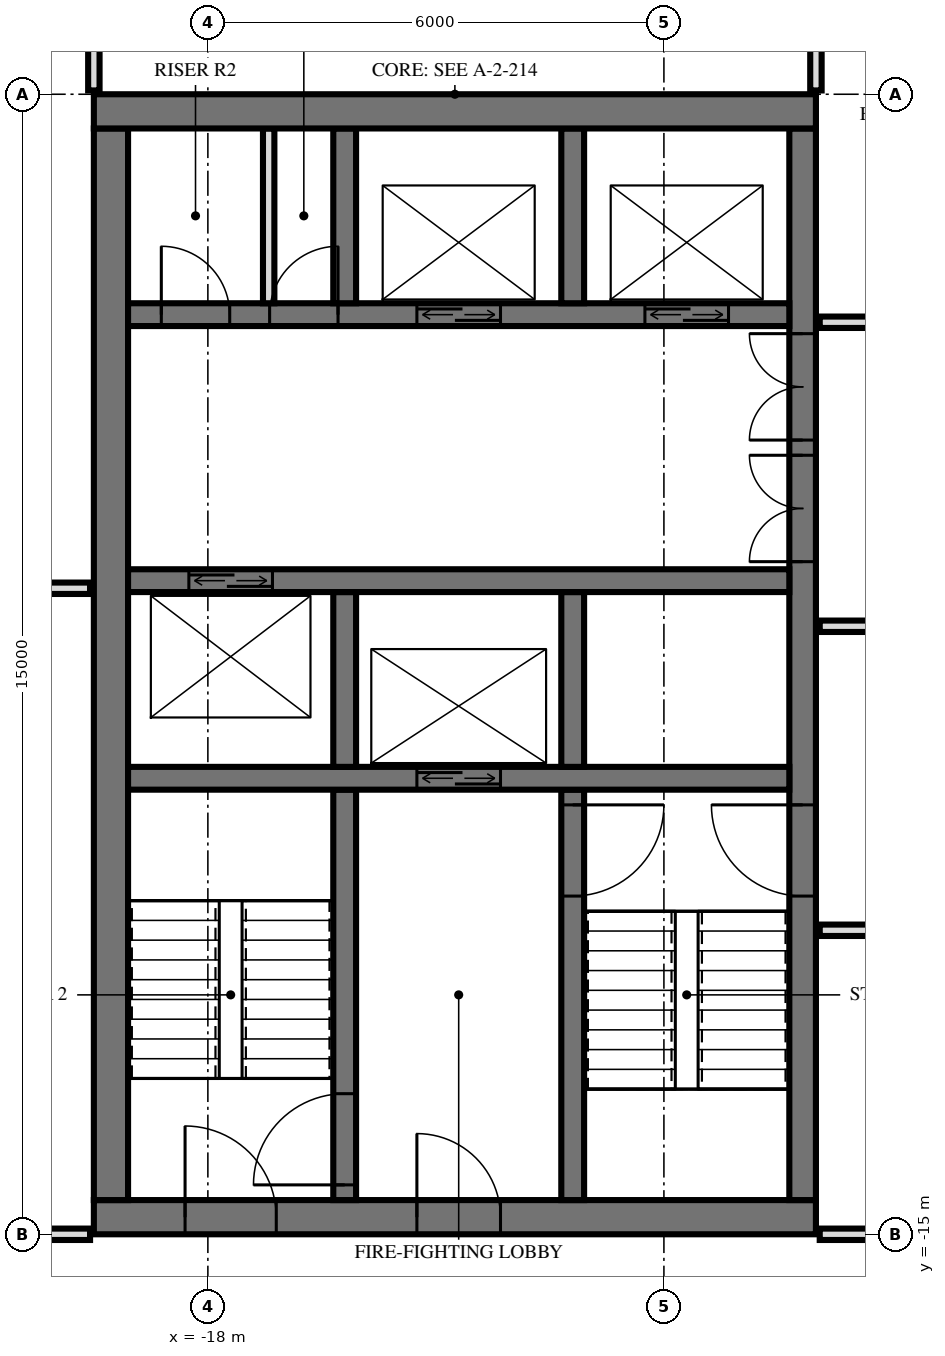
"""IFC4 building model, lengths in metres.
Left out: names, types, materials, properties, quantities, classifications, styles, units other than length and angle.
Written with IfcOpenShell. Run it as: python <this file> out.ifc"""

import sys

from ifc_helpers import new_model, si_unit, direction, frame, frame_2d, origin, place, context, subcontext, project, spatial, rectangle, extrude, element, fill, save


model = new_model("IFC4")
c1 = context("Model", 3, precision=1e-05, world=origin(), true_north=direction((0.0, 1.0)))
c2 = subcontext(c1, "Body", "Model", "MODEL_VIEW")
j1 = project(units=[si_unit("LENGTHUNIT", "METRE"), si_unit("PLANEANGLEUNIT", "RADIAN")], contexts=[c1])
p1 = place(None, origin())
s1 = spatial("IfcSite", under=j1, at=p1, CompositionType="ELEMENT")
p2 = place(p1, origin())
s2 = spatial("IfcBuilding", under=s1, at=p2, CompositionType="ELEMENT")
p3 = place(p2, frame((0.0, 0.0, 298.1)))
s3 = spatial("IfcBuildingStorey", under=s2, at=p3, CompositionType="ELEMENT", Elevation=298.1)
p4 = place(p3, frame((-19.5, -0.225, 0.0), z_axis=(0.0, 0.0, 1.0), x_axis=(1.0, 0.0, 0.0)))
e1 = element("IfcWall", 1, at=p4, inside=s3, PredefinedType="SHEAR", context=c2, shape_type="SweptSolid", body=[
    extrude(rectangle(XDim=9.5, YDim=0.45, at=frame_2d((4.75, 0.0))), origin(), (0.0, 0.0, 1.0), 3.5),
])
p5 = place(p3, frame((-19.5, -14.775, 0.0), z_axis=(0.0, 0.0, 1.0), x_axis=(1.0, 0.0, 0.0)))
e2 = element("IfcWall", 2, at=p5, inside=s3, PredefinedType="SHEAR", context=c2, shape_type="SweptSolid", body=[
    extrude(rectangle(XDim=9.5, YDim=0.45, at=frame_2d((4.75, 0.0))), origin(), (0.0, 0.0, 1.0), 3.5),
])
p6 = place(p5, frame((1.2, 0.0, 0.0)))
e3 = element("IfcOpeningElement", 3, at=p6, cuts=e2, PredefinedType="OPENING", context=c2, shape_type="SweptSolid", body=[
    extrude(rectangle(XDim=1.2, YDim=2.1, at=frame_2d((0.6, 1.05))), frame((0.0, 0.235, 0.0), z_axis=(0.0, -1.0, 0.0), x_axis=(1.0, 0.0, 0.0)), (0.0, 0.0, 1.0), 0.47),
])
p7 = place(p5, frame((4.25, 0.0, 0.0)))
e4 = element("IfcOpeningElement", 4, at=p7, cuts=e2, PredefinedType="OPENING", context=c2, shape_type="SweptSolid", body=[
    extrude(rectangle(XDim=1.1, YDim=2.1, at=frame_2d((0.55, 1.05))), frame((0.0, 0.235, 0.0), z_axis=(0.0, -1.0, 0.0), x_axis=(1.0, 0.0, 0.0)), (0.0, 0.0, 1.0), 0.47),
])
p8 = place(p3, frame((-10.175, -14.55, 0.0), z_axis=(0.0, 0.0, 1.0), x_axis=(0.0, 1.0, 0.0)))
e5 = element("IfcWall", 5, at=p8, inside=s3, PredefinedType="SHEAR", context=c2, shape_type="SweptSolid", body=[
    extrude(rectangle(XDim=14.1, YDim=0.35, at=frame_2d((7.05, 0.0))), origin(), (0.0, 0.0, 1.0), 3.5),
])
p9 = place(p8, frame((8.4, 0.0, 0.0)))
e6 = element("IfcOpeningElement", 6, at=p9, cuts=e5, PredefinedType="OPENING", context=c2, shape_type="SweptSolid", body=[
    extrude(rectangle(XDim=1.4, YDim=2.4, at=frame_2d((0.7, 1.2))), frame((0.0, 0.185, 0.0), z_axis=(0.0, -1.0, 0.0), x_axis=(1.0, 0.0, 0.0)), (0.0, 0.0, 1.0), 0.37),
])
p10 = place(p8, frame((10.0, 0.0, 0.0)))
e7 = element("IfcOpeningElement", 7, at=p10, cuts=e5, PredefinedType="OPENING", context=c2, shape_type="SweptSolid", body=[
    extrude(rectangle(XDim=1.4, YDim=2.4, at=frame_2d((0.7, 1.2))), frame((0.0, 0.185, 0.0), z_axis=(0.0, -1.0, 0.0), x_axis=(1.0, 0.0, 0.0)), (0.0, 0.0, 1.0), 0.37),
])
p11 = place(p8, frame((4.0, 0.0, 0.0)))
e8 = element("IfcOpeningElement", 8, at=p11, cuts=e5, PredefinedType="OPENING", context=c2, shape_type="SweptSolid", body=[
    extrude(rectangle(XDim=1.2, YDim=2.1, at=frame_2d((0.6, 1.05))), frame((0.0, 0.185, 0.0), z_axis=(0.0, -1.0, 0.0), x_axis=(1.0, 0.0, 0.0)), (0.0, 0.0, 1.0), 0.37),
])
p12 = place(p3, frame((-19.275, -14.55, 0.0), z_axis=(0.0, 0.0, 1.0), x_axis=(0.0, 1.0, 0.0)))
e9 = element("IfcWall", 9, at=p12, inside=s3, PredefinedType="SHEAR", context=c2, shape_type="SweptSolid", body=[
    extrude(rectangle(XDim=14.1, YDim=0.45, at=frame_2d((7.05, 0.0))), origin(), (0.0, 0.0, 1.0), 3.5),
])
p13 = place(p3, frame((-19.05, -2.9, 0.0), z_axis=(0.0, 0.0, 1.0), x_axis=(1.0, 0.0, 0.0)))
e10 = element("IfcWall", 10, at=p13, inside=s3, PredefinedType="SHEAR", context=c2, shape_type="SweptSolid", body=[
    extrude(rectangle(XDim=8.7, YDim=0.3, at=frame_2d((4.35, 0.0))), origin(), (0.0, 0.0, 1.0), 3.5),
])
p14 = place(p13, frame((6.8, 0.0, 0.0)))
e11 = element("IfcOpeningElement", 11, at=p14, cuts=e10, PredefinedType="OPENING", context=c2, shape_type="SweptSolid", body=[
    extrude(rectangle(XDim=1.1, YDim=2.1, at=frame_2d((0.55, 1.05))), frame((0.0, 0.16, 0.0), z_axis=(0.0, -1.0, 0.0), x_axis=(1.0, 0.0, 0.0)), (0.0, 0.0, 1.0), 0.32),
])
p15 = place(p13, frame((3.8, 0.0, 0.0)))
e12 = element("IfcOpeningElement", 12, at=p15, cuts=e10, PredefinedType="OPENING", context=c2, shape_type="SweptSolid", body=[
    extrude(rectangle(XDim=1.1, YDim=2.1, at=frame_2d((0.55, 1.05))), frame((0.0, 0.16, 0.0), z_axis=(0.0, -1.0, 0.0), x_axis=(1.0, 0.0, 0.0)), (0.0, 0.0, 1.0), 0.32),
])
p16 = place(p13, frame((1.863, 0.0, 0.0)))
e13 = element("IfcOpeningElement", 13, at=p16, cuts=e10, PredefinedType="OPENING", context=c2, shape_type="SweptSolid", body=[
    extrude(rectangle(XDim=0.9, YDim=2.1, at=frame_2d((0.45, 1.05))), frame((0.0, 0.16, 0.0), z_axis=(0.0, -1.0, 0.0), x_axis=(1.0, 0.0, 0.0)), (0.0, 0.0, 1.0), 0.32),
])
p17 = place(p13, frame((0.438, 0.0, 0.0)))
e14 = element("IfcOpeningElement", 14, at=p17, cuts=e10, PredefinedType="OPENING", context=c2, shape_type="SweptSolid", body=[
    extrude(rectangle(XDim=0.9, YDim=2.1, at=frame_2d((0.45, 1.05))), frame((0.0, 0.16, 0.0), z_axis=(0.0, -1.0, 0.0), x_axis=(1.0, 0.0, 0.0)), (0.0, 0.0, 1.0), 0.32),
])
p18 = place(p3, frame((-19.05, -6.4, 0.0), z_axis=(0.0, 0.0, 1.0), x_axis=(1.0, 0.0, 0.0)))
e15 = element("IfcWall", 15, at=p18, inside=s3, PredefinedType="SHEAR", context=c2, shape_type="SweptSolid", body=[
    extrude(rectangle(XDim=8.7, YDim=0.3, at=frame_2d((4.35, 0.0))), origin(), (0.0, 0.0, 1.0), 3.5),
])
p19 = place(p18, frame((0.8, 0.0, 0.0)))
e16 = element("IfcOpeningElement", 16, at=p19, cuts=e15, PredefinedType="OPENING", context=c2, shape_type="SweptSolid", body=[
    extrude(rectangle(XDim=1.1, YDim=2.1, at=frame_2d((0.55, 1.05))), frame((0.0, 0.16, 0.0), z_axis=(0.0, -1.0, 0.0), x_axis=(1.0, 0.0, 0.0)), (0.0, 0.0, 1.0), 0.32),
])
p20 = place(p3, frame((-19.05, -9.0, 0.0), z_axis=(0.0, 0.0, 1.0), x_axis=(1.0, 0.0, 0.0)))
e17 = element("IfcWall", 17, at=p20, inside=s3, PredefinedType="SHEAR", context=c2, shape_type="SweptSolid", body=[
    extrude(rectangle(XDim=8.7, YDim=0.3, at=frame_2d((4.35, 0.0))), origin(), (0.0, 0.0, 1.0), 3.5),
])
p21 = place(p20, frame((3.8, 0.0, 0.0)))
e18 = element("IfcOpeningElement", 18, at=p21, cuts=e17, PredefinedType="OPENING", context=c2, shape_type="SweptSolid", body=[
    extrude(rectangle(XDim=1.1, YDim=2.1, at=frame_2d((0.55, 1.05))), frame((0.0, 0.16, 0.0), z_axis=(0.0, -1.0, 0.0), x_axis=(1.0, 0.0, 0.0)), (0.0, 0.0, 1.0), 0.32),
])
for number, where, z_axis, x_axis in (
    (19, (-13.2, -2.75, 0.0), (0.0, 0.0, 1.0), (0.0, 1.0, 0.0)),
    (20, (-13.2, -8.85, 0.0), (0.0, 0.0, 1.0), (0.0, 1.0, 0.0)),
):
    element("IfcWall", number, at=place(p3, frame(where, z_axis=z_axis, x_axis=x_axis)), inside=s3, PredefinedType="SHEAR", context=c2, shape_type="SweptSolid", body=[
        extrude(rectangle(XDim=2.3, YDim=0.3, at=frame_2d((1.15, 0.0))), origin(), (0.0, 0.0, 1.0), 3.5),
    ])
p22 = place(p3, frame((-13.2, -14.55, 0.0), z_axis=(0.0, 0.0, 1.0), x_axis=(0.0, 1.0, 0.0)))
e21 = element("IfcWall", 21, at=p22, inside=s3, PredefinedType="SHEAR", context=c2, shape_type="SweptSolid", body=[
    extrude(rectangle(XDim=5.4, YDim=0.3, at=frame_2d((2.7, 0.0))), origin(), (0.0, 0.0, 1.0), 3.5),
])
p23 = place(p22, frame((4.0, 0.0, 0.0)))
e22 = element("IfcOpeningElement", 22, at=p23, cuts=e21, PredefinedType="OPENING", context=c2, shape_type="SweptSolid", body=[
    extrude(rectangle(XDim=1.2, YDim=2.1, at=frame_2d((0.6, 1.05))), frame((0.0, 0.16, 0.0), z_axis=(0.0, -1.0, 0.0), x_axis=(1.0, 0.0, 0.0)), (0.0, 0.0, 1.0), 0.32),
])
for number, where, z_axis, x_axis in (
    (23, (-16.2, -2.75, 0.0), (0.0, 0.0, 1.0), (0.0, 1.0, 0.0)),
    (24, (-16.2, -8.85, 0.0), (0.0, 0.0, 1.0), (0.0, 1.0, 0.0)),
):
    element("IfcWall", number, at=place(p3, frame(where, z_axis=z_axis, x_axis=x_axis)), inside=s3, PredefinedType="SHEAR", context=c2, shape_type="SweptSolid", body=[
        extrude(rectangle(XDim=2.3, YDim=0.3, at=frame_2d((1.15, 0.0))), origin(), (0.0, 0.0, 1.0), 3.5),
    ])
p24 = place(p3, frame((-16.2, -14.55, 0.0), z_axis=(0.0, 0.0, 1.0), x_axis=(0.0, 1.0, 0.0)))
e25 = element("IfcWall", 25, at=p24, inside=s3, PredefinedType="SHEAR", context=c2, shape_type="SweptSolid", body=[
    extrude(rectangle(XDim=5.4, YDim=0.3, at=frame_2d((2.7, 0.0))), origin(), (0.0, 0.0, 1.0), 3.5),
])
p25 = place(p24, frame((0.2, 0.0, 0.0)))
e26 = element("IfcOpeningElement", 26, at=p25, cuts=e25, PredefinedType="OPENING", context=c2, shape_type="SweptSolid", body=[
    extrude(rectangle(XDim=1.2, YDim=2.1, at=frame_2d((0.6, 1.05))), frame((0.0, 0.16, 0.0), z_axis=(0.0, -1.0, 0.0), x_axis=(1.0, 0.0, 0.0)), (0.0, 0.0, 1.0), 0.32),
])
p26 = place(p3, frame((-17.2, -2.75, 0.0), z_axis=(0.0, 0.0, 1.0), x_axis=(0.0, 1.0, 0.0)))
e27 = element("IfcWall", 27, at=p26, inside=s3, PredefinedType="PARTITIONING", context=c2, shape_type="SweptSolid", body=[
    extrude(rectangle(XDim=2.3, YDim=0.15, at=frame_2d((1.15, 0.0))), origin(), (0.0, 0.0, 1.0), 3.2),
])
p27 = place(p3, frame((-10.0, 0.05, 0.0), z_axis=(0.0, 0.0, 1.0), x_axis=(0.0, 1.0, 0.0)))
e28 = element("IfcWall", 28, at=p27, inside=s3, PredefinedType="PARTITIONING", context=c2, shape_type="SweptSolid", body=[
    extrude(rectangle(XDim=0.97, YDim=0.15, at=frame_2d((0.485, 0.0))), origin(), (0.0, 0.0, 1.0), 3.22),
])
p28 = place(p3, frame((-19.5, 0.05, 0.0), z_axis=(0.0, 0.0, 1.0), x_axis=(0.0, 1.0, 0.0)))
e29 = element("IfcWall", 29, at=p28, inside=s3, PredefinedType="PARTITIONING", context=c2, shape_type="SweptSolid", body=[
    extrude(rectangle(XDim=0.787, YDim=0.15, at=frame_2d((0.394, 0.0))), origin(), (0.0, 0.0, 1.0), 3.22),
])
p29 = place(p3, frame((-22.92, -15.0, 0.0), z_axis=(0.0, 0.0, 1.0), x_axis=(1.0, 0.0, 0.0)))
e30 = element("IfcWall", 30, at=p29, inside=s3, PredefinedType="PARTITIONING", context=c2, shape_type="SweptSolid", body=[
    extrude(rectangle(XDim=3.37, YDim=0.15, at=frame_2d((1.685, 0.0))), origin(), (0.0, 0.0, 1.0), 3.22),
])
p30 = place(p29, frame((1.47, 0.0, 0.0)))
e31 = element("IfcOpeningElement", 31, at=p30, cuts=e30, PredefinedType="OPENING", context=c2, shape_type="SweptSolid", body=[
    extrude(rectangle(XDim=1.0, YDim=2.1, at=frame_2d((0.5, 1.05))), frame((0.0, 0.085, 0.0), z_axis=(0.0, -1.0, 0.0), x_axis=(1.0, 0.0, 0.0)), (0.0, 0.0, 1.0), 0.17),
])
p31 = place(p3, frame((-9.95, -15.0, 0.0), z_axis=(0.0, 0.0, 1.0), x_axis=(1.0, 0.0, 0.0)))
e32 = element("IfcWall", 32, at=p31, inside=s3, PredefinedType="PARTITIONING", context=c2, shape_type="SweptSolid", body=[
    extrude(rectangle(XDim=19.9, YDim=0.15, at=frame_2d((9.95, 0.0))), origin(), (0.0, 0.0, 1.0), 2.584),
])
p32 = place(p31, frame((9.45, 0.0, 0.0)))
e33 = element("IfcOpeningElement", 33, at=p32, cuts=e32, PredefinedType="OPENING", context=c2, shape_type="SweptSolid", body=[
    extrude(rectangle(XDim=1.0, YDim=2.1, at=frame_2d((0.5, 1.05))), frame((0.0, 0.085, 0.0), z_axis=(0.0, -1.0, 0.0), x_axis=(1.0, 0.0, 0.0)), (0.0, 0.0, 1.0), 0.17),
])
p33 = place(p3, frame((-9.95, -11.0, 0.0), z_axis=(0.0, 0.0, 1.0), x_axis=(1.0, 0.0, 0.0)))
e34 = element("IfcWall", 34, at=p33, inside=s3, PredefinedType="PARTITIONING", context=c2, shape_type="SweptSolid", body=[
    extrude(rectangle(XDim=19.9, YDim=0.15, at=frame_2d((9.95, 0.0))), origin(), (0.0, 0.0, 1.0), 3.22),
])
p34 = place(p33, frame((9.45, 0.0, 0.0)))
e35 = element("IfcOpeningElement", 35, at=p34, cuts=e34, PredefinedType="OPENING", context=c2, shape_type="SweptSolid", body=[
    extrude(rectangle(XDim=1.0, YDim=2.1, at=frame_2d((0.5, 1.05))), frame((0.0, 0.085, 0.0), z_axis=(0.0, -1.0, 0.0), x_axis=(1.0, 0.0, 0.0)), (0.0, 0.0, 1.0), 0.17),
])
p35 = place(p33, frame((15.45, 0.0, 0.0)))
e36 = element("IfcOpeningElement", 36, at=p35, cuts=e34, PredefinedType="OPENING", context=c2, shape_type="SweptSolid", body=[
    extrude(rectangle(XDim=1.0, YDim=2.1, at=frame_2d((0.5, 1.05))), frame((0.0, 0.085, 0.0), z_axis=(0.0, -1.0, 0.0), x_axis=(1.0, 0.0, 0.0)), (0.0, 0.0, 1.0), 0.17),
])
p36 = place(p3, frame((-9.95, -7.0, 0.0), z_axis=(0.0, 0.0, 1.0), x_axis=(1.0, 0.0, 0.0)))
e37 = element("IfcWall", 37, at=p36, inside=s3, PredefinedType="PARTITIONING", context=c2, shape_type="SweptSolid", body=[
    extrude(rectangle(XDim=19.9, YDim=0.15, at=frame_2d((9.95, 0.0))), origin(), (0.0, 0.0, 1.0), 3.22),
])
p37 = place(p36, frame((9.45, 0.0, 0.0)))
e38 = element("IfcOpeningElement", 38, at=p37, cuts=e37, PredefinedType="OPENING", context=c2, shape_type="SweptSolid", body=[
    extrude(rectangle(XDim=1.0, YDim=2.1, at=frame_2d((0.5, 1.05))), frame((0.0, 0.085, 0.0), z_axis=(0.0, -1.0, 0.0), x_axis=(1.0, 0.0, 0.0)), (0.0, 0.0, 1.0), 0.17),
])
p38 = place(p36, frame((3.45, 0.0, 0.0)))
e39 = element("IfcOpeningElement", 39, at=p38, cuts=e37, PredefinedType="OPENING", context=c2, shape_type="SweptSolid", body=[
    extrude(rectangle(XDim=1.0, YDim=2.1, at=frame_2d((0.5, 1.05))), frame((0.0, 0.085, 0.0), z_axis=(0.0, -1.0, 0.0), x_axis=(1.0, 0.0, 0.0)), (0.0, 0.0, 1.0), 0.17),
])
p39 = place(p3, frame((-22.92, -6.5, 0.0), z_axis=(0.0, 0.0, 1.0), x_axis=(1.0, 0.0, 0.0)))
e40 = element("IfcWall", 40, at=p39, inside=s3, PredefinedType="PARTITIONING", context=c2, shape_type="SweptSolid", body=[
    extrude(rectangle(XDim=3.37, YDim=0.15, at=frame_2d((1.685, 0.0))), origin(), (0.0, 0.0, 1.0), 3.22),
])
p40 = place(p39, frame((1.17, 0.0, 0.0)))
e41 = element("IfcOpeningElement", 41, at=p40, cuts=e40, PredefinedType="OPENING", context=c2, shape_type="SweptSolid", body=[
    extrude(rectangle(XDim=0.9, YDim=2.1, at=frame_2d((0.45, 1.05))), frame((0.0, 0.085, 0.0), z_axis=(0.0, -1.0, 0.0), x_axis=(1.0, 0.0, 0.0)), (0.0, 0.0, 1.0), 0.17),
])
p41 = place(p3, frame((-9.95, -3.0, 0.0), z_axis=(0.0, 0.0, 1.0), x_axis=(1.0, 0.0, 0.0)))
e42 = element("IfcWall", 42, at=p41, inside=s3, PredefinedType="PARTITIONING", context=c2, shape_type="SweptSolid", body=[
    extrude(rectangle(XDim=19.9, YDim=0.15, at=frame_2d((9.95, 0.0))), origin(), (0.0, 0.0, 1.0), 3.22),
])
p42 = place(p41, frame((1.45, 0.0, 0.0)))
e43 = element("IfcOpeningElement", 43, at=p42, cuts=e42, PredefinedType="OPENING", context=c2, shape_type="SweptSolid", body=[
    extrude(rectangle(XDim=1.0, YDim=2.1, at=frame_2d((0.5, 1.05))), frame((0.0, 0.085, 0.0), z_axis=(0.0, -1.0, 0.0), x_axis=(1.0, 0.0, 0.0)), (0.0, 0.0, 1.0), 0.17),
])
p43 = place(p41, frame((4.95, 0.0, 0.0)))
e44 = element("IfcOpeningElement", 44, at=p43, cuts=e42, PredefinedType="OPENING", context=c2, shape_type="SweptSolid", body=[
    extrude(rectangle(XDim=1.0, YDim=2.1, at=frame_2d((0.5, 1.05))), frame((0.0, 0.085, 0.0), z_axis=(0.0, -1.0, 0.0), x_axis=(1.0, 0.0, 0.0)), (0.0, 0.0, 1.0), 0.17),
])
p44 = place(p41, frame((7.7, 0.0, 0.0)))
e45 = element("IfcOpeningElement", 45, at=p44, cuts=e42, PredefinedType="OPENING", context=c2, shape_type="SweptSolid", body=[
    extrude(rectangle(XDim=1.0, YDim=2.1, at=frame_2d((0.5, 1.05))), frame((0.0, 0.085, 0.0), z_axis=(0.0, -1.0, 0.0), x_axis=(1.0, 0.0, 0.0)), (0.0, 0.0, 1.0), 0.17),
])
p45 = place(p41, frame((14.2, 0.0, 0.0)))
e46 = element("IfcOpeningElement", 46, at=p45, cuts=e42, PredefinedType="OPENING", context=c2, shape_type="SweptSolid", body=[
    extrude(rectangle(XDim=1.0, YDim=2.1, at=frame_2d((0.5, 1.05))), frame((0.0, 0.085, 0.0), z_axis=(0.0, -1.0, 0.0), x_axis=(1.0, 0.0, 0.0)), (0.0, 0.0, 1.0), 0.17),
])
p46 = place(p14, origin())
e47 = element("IfcDoor", 47, at=p46, inside=s3, OperationType="DOUBLE_DOOR_SLIDING", PredefinedType="USERDEFINED", context=c2, shape_type="SweptSolid", body=[
    extrude(rectangle(XDim=1.1, YDim=2.1, at=frame_2d((0.55, 1.05))), frame((0.0, 0.025, 0.0), z_axis=(0.0, -1.0, 0.0), x_axis=(1.0, 0.0, 0.0)), (0.0, 0.0, 1.0), 0.05),
])
fill(e11, e47)
p47 = place(p15, origin())
e48 = element("IfcDoor", 48, at=p47, inside=s3, OperationType="DOUBLE_DOOR_SLIDING", PredefinedType="USERDEFINED", context=c2, shape_type="SweptSolid", body=[
    extrude(rectangle(XDim=1.1, YDim=2.1, at=frame_2d((0.55, 1.05))), frame((0.0, 0.025, 0.0), z_axis=(0.0, -1.0, 0.0), x_axis=(1.0, 0.0, 0.0)), (0.0, 0.0, 1.0), 0.05),
])
fill(e12, e48)
p48 = place(p21, origin())
e49 = element("IfcDoor", 49, at=p48, inside=s3, OperationType="DOUBLE_DOOR_SLIDING", PredefinedType="USERDEFINED", context=c2, shape_type="SweptSolid", body=[
    extrude(rectangle(XDim=1.1, YDim=2.1, at=frame_2d((0.55, 1.05))), frame((0.0, 0.025, 0.0), z_axis=(0.0, -1.0, 0.0), x_axis=(1.0, 0.0, 0.0)), (0.0, 0.0, 1.0), 0.05),
])
fill(e18, e49)
p49 = place(p19, origin())
e50 = element("IfcDoor", 50, at=p49, inside=s3, OperationType="DOUBLE_DOOR_SLIDING", PredefinedType="USERDEFINED", context=c2, shape_type="SweptSolid", body=[
    extrude(rectangle(XDim=1.1, YDim=2.1, at=frame_2d((0.55, 1.05))), frame((0.0, 0.025, 0.0), z_axis=(0.0, -1.0, 0.0), x_axis=(1.0, 0.0, 0.0)), (0.0, 0.0, 1.0), 0.05),
])
fill(e16, e50)
p50 = place(p9, origin())
e51 = element("IfcDoor", 51, at=p50, inside=s3, OperationType="DOUBLE_DOOR_SINGLE_SWING", PredefinedType="DOOR", context=c2, shape_type="SweptSolid", body=[
    extrude(rectangle(XDim=1.4, YDim=2.4, at=frame_2d((0.7, 1.2))), frame((0.0, 0.025, 0.0), z_axis=(0.0, -1.0, 0.0), x_axis=(1.0, 0.0, 0.0)), (0.0, 0.0, 1.0), 0.05),
])
fill(e6, e51)
p51 = place(p10, origin())
e52 = element("IfcDoor", 52, at=p51, inside=s3, OperationType="DOUBLE_DOOR_SINGLE_SWING", PredefinedType="DOOR", context=c2, shape_type="SweptSolid", body=[
    extrude(rectangle(XDim=1.4, YDim=2.4, at=frame_2d((0.7, 1.2))), frame((0.0, 0.025, 0.0), z_axis=(0.0, -1.0, 0.0), x_axis=(1.0, 0.0, 0.0)), (0.0, 0.0, 1.0), 0.05),
])
fill(e7, e52)
p52 = place(p11, origin())
e53 = element("IfcDoor", 53, at=p52, inside=s3, OperationType="SINGLE_SWING_LEFT", PredefinedType="DOOR", context=c2, shape_type="SweptSolid", body=[
    extrude(rectangle(XDim=1.2, YDim=2.1, at=frame_2d((0.6, 1.05))), frame((0.0, 0.025, 0.0), z_axis=(0.0, -1.0, 0.0), x_axis=(1.0, 0.0, 0.0)), (0.0, 0.0, 1.0), 0.05),
])
fill(e8, e53)
p53 = place(p6, origin())
e54 = element("IfcDoor", 54, at=p53, inside=s3, OperationType="SINGLE_SWING_RIGHT", PredefinedType="DOOR", context=c2, shape_type="SweptSolid", body=[
    extrude(rectangle(XDim=1.2, YDim=2.1, at=frame_2d((0.6, 1.05))), frame((0.0, 0.025, 0.0), z_axis=(0.0, -1.0, 0.0), x_axis=(1.0, 0.0, 0.0)), (0.0, 0.0, 1.0), 0.05),
])
fill(e3, e54)
p54 = place(p7, origin())
e55 = element("IfcDoor", 55, at=p54, inside=s3, OperationType="SINGLE_SWING_RIGHT", PredefinedType="DOOR", context=c2, shape_type="SweptSolid", body=[
    extrude(rectangle(XDim=1.1, YDim=2.1, at=frame_2d((0.55, 1.05))), frame((0.0, 0.025, 0.0), z_axis=(0.0, -1.0, 0.0), x_axis=(1.0, 0.0, 0.0)), (0.0, 0.0, 1.0), 0.05),
])
fill(e4, e55)
p55 = place(p16, origin())
e56 = element("IfcDoor", 56, at=p55, inside=s3, OperationType="SINGLE_SWING_LEFT", PredefinedType="DOOR", context=c2, shape_type="SweptSolid", body=[
    extrude(rectangle(XDim=0.9, YDim=2.1, at=frame_2d((0.45, 1.05))), frame((0.0, 0.025, 0.0), z_axis=(0.0, -1.0, 0.0), x_axis=(1.0, 0.0, 0.0)), (0.0, 0.0, 1.0), 0.05),
])
fill(e13, e56)
p56 = place(p17, origin())
e57 = element("IfcDoor", 57, at=p56, inside=s3, OperationType="SINGLE_SWING_RIGHT", PredefinedType="DOOR", context=c2, shape_type="SweptSolid", body=[
    extrude(rectangle(XDim=0.9, YDim=2.1, at=frame_2d((0.45, 1.05))), frame((0.0, 0.025, 0.0), z_axis=(0.0, -1.0, 0.0), x_axis=(1.0, 0.0, 0.0)), (0.0, 0.0, 1.0), 0.05),
])
fill(e14, e57)
p57 = place(p23, frame((0.6, 0.0, 0.0), z_axis=(0.0, 0.0, 1.0), x_axis=(-1.0, 0.0, 0.0)))
e58 = element("IfcDoor", 58, at=p57, inside=s3, OperationType="SINGLE_SWING_RIGHT", PredefinedType="DOOR", context=c2, shape_type="SweptSolid", body=[
    extrude(rectangle(XDim=1.2, YDim=2.1, at=frame_2d((0.0, 1.05))), frame((0.0, -0.025, 0.0), z_axis=(0.0, 1.0, 0.0), x_axis=(-1.0, 0.0, 0.0)), (0.0, 0.0, 1.0), 0.05),
])
fill(e22, e58)
p58 = place(p25, origin())
e59 = element("IfcDoor", 59, at=p58, inside=s3, OperationType="SINGLE_SWING_RIGHT", PredefinedType="DOOR", context=c2, shape_type="SweptSolid", body=[
    extrude(rectangle(XDim=1.2, YDim=2.1, at=frame_2d((0.6, 1.05))), frame((0.0, 0.025, 0.0), z_axis=(0.0, -1.0, 0.0), x_axis=(1.0, 0.0, 0.0)), (0.0, 0.0, 1.0), 0.05),
])
fill(e26, e59)
save(model, sys.argv[1])
